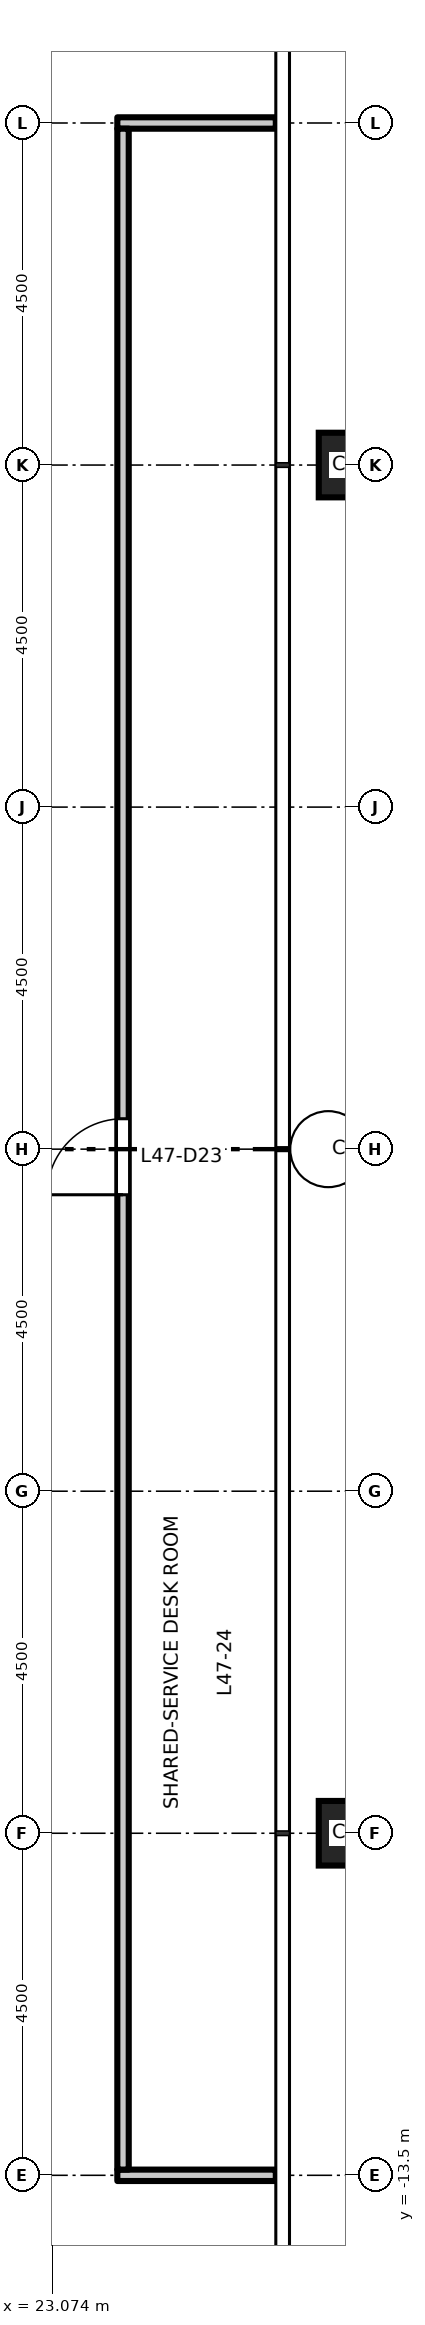
"""IFC4 building model, lengths in metres.
Left out: names, types, materials, properties, quantities, classifications, styles, units other than length and angle.
Written with IfcOpenShell. Run it as: python <this file> out.ifc"""

import sys

from ifc_helpers import new_model, si_unit, direction, frame, frame_2d, origin, origin_2d, place, context, subcontext, project, spatial, rectangle, hollow_rectangle, extrude, element, fill, save


model = new_model("IFC4")
c1 = context("Model", 3, precision=1e-05, world=origin(), true_north=direction((0.0, 1.0)))
c2 = subcontext(c1, "Body", "Model", "MODEL_VIEW")
j1 = project(units=[si_unit("LENGTHUNIT", "METRE"), si_unit("PLANEANGLEUNIT", "RADIAN")], contexts=[c1])
p1 = place(None, origin())
s1 = spatial("IfcSite", under=j1, at=p1, CompositionType="ELEMENT")
p2 = place(p1, origin())
s2 = spatial("IfcBuilding", under=s1, at=p2, CompositionType="ELEMENT")
p3 = place(p2, frame((0.0, 0.0, 219.7)))
s3 = spatial("IfcBuildingStorey", under=s2, at=p3, CompositionType="ELEMENT", Elevation=219.7)
for number, where, z_axis, x_axis in (
    (1, (27.0, -9.0, 0.0), (0.0, 0.0, 1.0), (1.0, 0.0, 0.0)),
    (2, (27.0, 0.0, 0.0), (0.0, 0.0, 1.0), (1.0, 0.0, 0.0)),
    (3, (27.0, 9.0, 0.0), (0.0, 0.0, 1.0), (1.0, 0.0, 0.0)),
):
    element("IfcColumn", number, at=place(p3, frame(where, z_axis=z_axis, x_axis=x_axis)), inside=s3, PredefinedType="COLUMN", context=c2, shape_type="SweptSolid", body=[
        extrude(hollow_rectangle(XDim=0.85, YDim=0.85, WallThickness=0.05, at=origin_2d()), origin(), (0.0, 0.0, 1.0), 4.5),
    ])
p4 = place(p3, frame((23.925, -13.5, 0.0), z_axis=(0.0, 0.0, 1.0), x_axis=(1.0, 0.0, 0.0)))
e4 = element("IfcWall", 4, at=p4, inside=s3, PredefinedType="PARTITIONING", context=c2, shape_type="SweptSolid", body=[
    extrude(rectangle(XDim=2.085, YDim=0.15, at=frame_2d((1.042, 0.0))), origin(), (0.0, 0.0, 1.0), 3.95),
])
p5 = place(p3, frame((23.925, 13.5, 0.0), z_axis=(0.0, 0.0, 1.0), x_axis=(1.0, 0.0, 0.0)))
e5 = element("IfcWall", 5, at=p5, inside=s3, PredefinedType="PARTITIONING", context=c2, shape_type="SweptSolid", body=[
    extrude(rectangle(XDim=2.085, YDim=0.15, at=frame_2d((1.042, 0.0))), origin(), (0.0, 0.0, 1.0), 4.35),
])
p6 = place(p3, frame((24.0, -13.425, 0.0), z_axis=(0.0, 0.0, 1.0), x_axis=(0.0, 1.0, 0.0)))
e6 = element("IfcWall", 6, at=p6, inside=s3, PredefinedType="PARTITIONING", context=c2, shape_type="SweptSolid", body=[
    extrude(rectangle(XDim=26.85, YDim=0.15, at=frame_2d((13.425, 0.0))), origin(), (0.0, 0.0, 1.0), 4.35),
])
p7 = place(p6, frame((12.825, 0.0, 0.0)))
e7 = element("IfcOpeningElement", 7, at=p7, cuts=e6, PredefinedType="OPENING", context=c2, shape_type="SweptSolid", body=[
    extrude(rectangle(XDim=1.0, YDim=2.1, at=frame_2d((0.5, 1.05))), frame((0.0, 0.085, 0.0), z_axis=(0.0, -1.0, 0.0), x_axis=(1.0, 0.0, 0.0)), (0.0, 0.0, 1.0), 0.17),
])
p8 = place(p7, origin())
e8 = element("IfcDoor", 8, at=p8, inside=s3, OperationType="SINGLE_SWING_LEFT", PredefinedType="DOOR", context=c2, shape_type="SweptSolid", body=[
    extrude(rectangle(XDim=1.0, YDim=2.1, at=frame_2d((0.5, 1.05))), frame((0.0, 0.025, 0.0), z_axis=(0.0, -1.0, 0.0), x_axis=(1.0, 0.0, 0.0)), (0.0, 0.0, 1.0), 0.05),
])
fill(e7, e8)
save(model, sys.argv[1])
